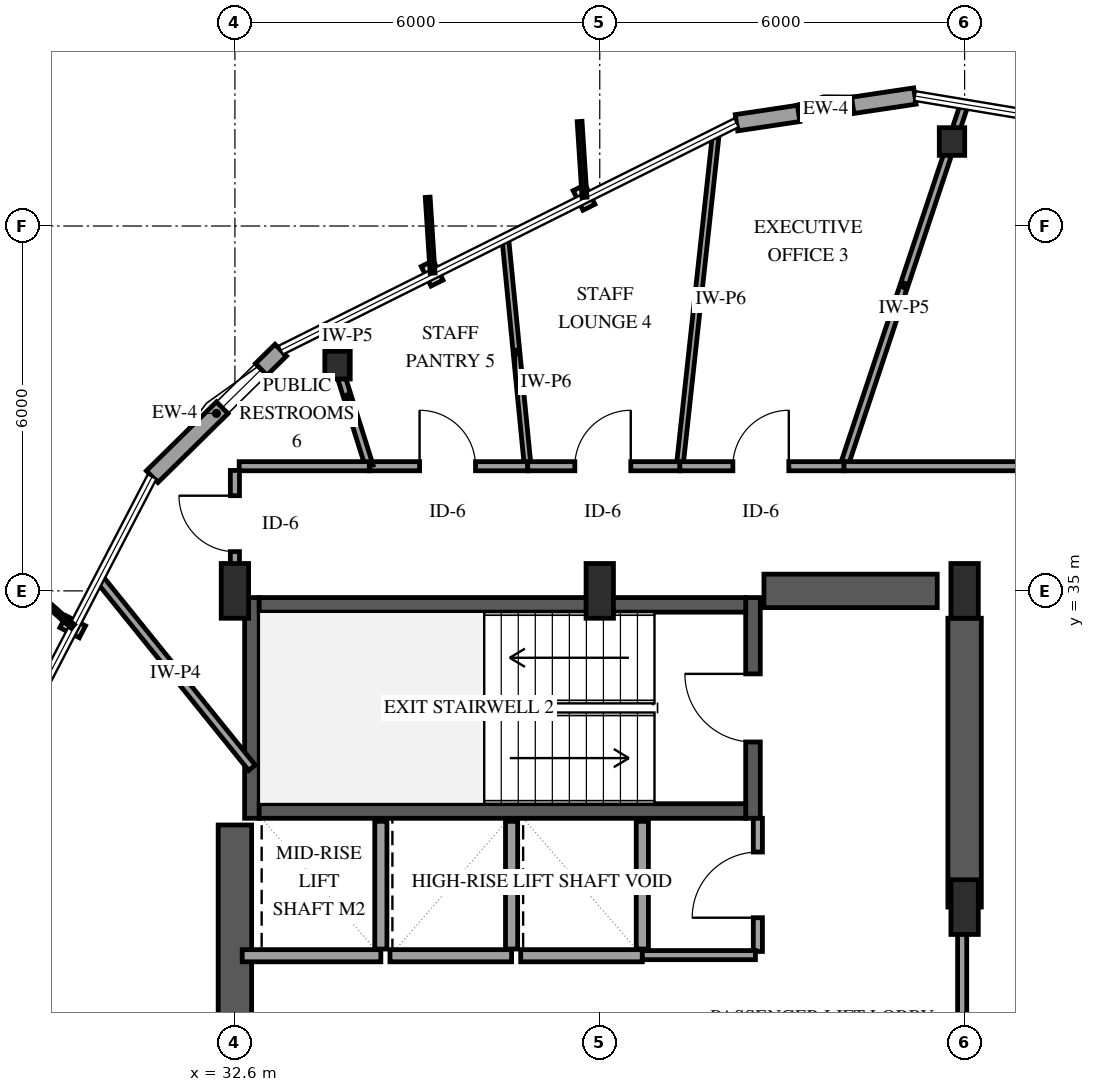
"""IFC4 building model, lengths in metres.
Left out: names, types, materials, properties, quantities, classifications, styles, units other than length and angle.
Written with IfcOpenShell. Run it as: python <this file> out.ifc"""

import sys

from ifc_helpers import new_model, si_unit, direction, frame, frame_2d, origin, origin_2d, place, context, subcontext, project, spatial, rectangle, i_section, extrude, element, fill, save


model = new_model("IFC4")
c1 = context("Model", 3, precision=1e-05, world=origin(), true_north=direction((0.0, 1.0)))
c2 = subcontext(c1, "Body", "Model", "MODEL_VIEW")
j1 = project(units=[si_unit("LENGTHUNIT", "METRE"), si_unit("PLANEANGLEUNIT", "RADIAN")], contexts=[c1])
p1 = place(None, origin())
s1 = spatial("IfcSite", under=j1, at=p1, CompositionType="ELEMENT")
p2 = place(p1, origin())
s2 = spatial("IfcBuilding", under=s1, at=p2, CompositionType="ELEMENT")
p3 = place(p2, frame((0.0, 0.0, 130.3)))
s3 = spatial("IfcBuildingStorey", under=s2, at=p3, CompositionType="ELEMENT", Elevation=130.3)
p4 = place(p3, frame((32.88, 31.26, 0.0), z_axis=(0.0, 0.0, 1.0), x_axis=(0.0, 1.0, 0.0)))
e1 = element("IfcWall", 1, at=p4, inside=s3, PredefinedType="SHEAR", context=c2, shape_type="SweptSolid", body=[
    extrude(rectangle(XDim=3.63, YDim=0.24, at=frame_2d((1.815, 0.0))), origin(), (0.0, 0.0, 1.0), 3.9),
])
p5 = place(p3, frame((41.12, 31.26, 0.0), z_axis=(0.0, 0.0, 1.0), x_axis=(0.0, 1.0, 0.0)))
e2 = element("IfcWall", 2, at=p5, inside=s3, PredefinedType="SHEAR", context=c2, shape_type="SweptSolid", body=[
    extrude(rectangle(XDim=3.63, YDim=0.24, at=frame_2d((1.815, 0.0))), origin(), (0.0, 0.0, 1.0), 3.9),
])
p6 = place(p5, frame((1.255, 0.0, 0.0)))
e3 = element("IfcOpeningElement", 3, at=p6, cuts=e2, PredefinedType="OPENING", context=c2, shape_type="SweptSolid", body=[
    extrude(rectangle(XDim=1.12, YDim=2.15, at=frame_2d((0.56, 1.075))), frame((0.0, 0.13, 0.0), z_axis=(0.0, -1.0, 0.0), x_axis=(1.0, 0.0, 0.0)), (0.0, 0.0, 1.0), 0.26),
])
for number, where, z_axis, x_axis in (
    (4, (33.0, 31.38, 0.0), (0.0, 0.0, 1.0), (1.0, 0.0, 0.0)),
    (5, (33.0, 34.77, 0.0), (0.0, 0.0, 1.0), (1.0, 0.0, 0.0)),
):
    element("IfcWall", number, at=place(p3, frame(where, z_axis=z_axis, x_axis=x_axis)), inside=s3, PredefinedType="SHEAR", context=c2, shape_type="SweptSolid", body=[
        extrude(rectangle(XDim=8.0, YDim=0.24, at=frame_2d((4.0, 0.0))), origin(), (0.0, 0.0, 1.0), 3.9),
    ])
p7 = place(p3, frame((32.6, 18.85, 0.0), z_axis=(0.0, 0.0, 1.0), x_axis=(0.0, 1.0, 0.0)))
e6 = element("IfcWall", 6, at=p7, inside=s3, PredefinedType="SHEAR", context=c2, shape_type="SweptSolid", body=[
    extrude(rectangle(XDim=12.3, YDim=0.55, at=frame_2d((6.15, 0.0))), origin(), (0.0, 0.0, 1.0), 3.9),
])
p8 = place(p3, frame((41.3, 35.0, 0.0), z_axis=(0.0, 0.0, 1.0), x_axis=(1.0, 0.0, 0.0)))
e7 = element("IfcWall", 7, at=p8, inside=s3, PredefinedType="SHEAR", context=c2, shape_type="SweptSolid", body=[
    extrude(rectangle(XDim=2.85, YDim=0.55, at=frame_2d((1.425, 0.0))), origin(), (0.0, 0.0, 1.0), 3.9),
])
p9 = place(p3, frame((44.6, 29.8, 0.0), z_axis=(0.0, 0.0, 1.0), x_axis=(0.0, 1.0, 0.0)))
e8 = element("IfcWall", 8, at=p9, inside=s3, PredefinedType="SHEAR", context=c2, shape_type="SweptSolid", body=[
    extrude(rectangle(XDim=4.75, YDim=0.55, at=frame_2d((2.375, 0.0))), origin(), (0.0, 0.0, 1.0), 3.9),
])
for number, where, z_axis, x_axis in (
    (9, (32.6, 35.0, 0.0), (0.0, 0.0, 1.0), (1.0, 0.0, 0.0)),
    (10, (38.6, 35.0, 0.0), (0.0, 0.0, 1.0), (1.0, 0.0, 0.0)),
    (11, (44.6, 29.8, 0.0), (0.0, 0.0, 1.0), (1.0, 0.0, 0.0)),
    (12, (44.6, 35.0, 0.0), (0.0, 0.0, 1.0), (1.0, 0.0, 0.0)),
):
    element("IfcColumn", number, at=place(p3, frame(where, z_axis=z_axis, x_axis=x_axis)), inside=s3, PredefinedType="PILASTER", context=c2, shape_type="SweptSolid", body=[
        extrude(rectangle(XDim=0.45, YDim=0.9, at=origin_2d()), origin(), (0.0, 0.0, 1.0), 3.9),
    ])
for number, where, z_axis, x_axis in (
    (13, (44.393, 42.389, 0.0), (0.0, 0.0, 1.0), (1.0, 0.0, 0.0)),
    (14, (34.288, 38.711, 0.0), (0.0, 0.0, 1.0), (1.0, 0.0, 0.0)),
):
    element("IfcColumn", number, at=place(p3, frame(where, z_axis=z_axis, x_axis=x_axis)), inside=s3, PredefinedType="COLUMN", context=c2, shape_type="SweptSolid", body=[
        extrude(i_section(OverallWidth=0.418, OverallDepth=0.455, WebThickness=0.042, FlangeThickness=0.068, FilletRadius=0.038, at=origin_2d()), origin(), (0.0, 0.0, 1.0), 3.9),
    ])
p10 = place(p3, frame((43.783, 43.138, 0.0), z_axis=(0.0, 0.0, 1.0), x_axis=(-0.988967117617, -0.148135209429, 0.0)))
e15 = element("IfcWall", 15, at=p10, inside=s3, PredefinedType="SOLIDWALL", context=c2, shape_type="SweptSolid", body=[
    extrude(rectangle(XDim=2.967, YDim=0.27, at=frame_2d((1.483, 0.0))), origin(), (0.0, 0.0, 1.0), 2.939),
])
p11 = place(p10, frame((1.033, 0.0, 0.75)))
e16 = element("IfcOpeningElement", 16, at=p11, cuts=e15, PredefinedType="OPENING", context=c2, shape_type="SweptSolid", body=[
    extrude(rectangle(XDim=0.9, YDim=1.5, at=frame_2d((0.45, 0.75))), frame((0.0, 0.145, 0.0), z_axis=(0.0, -1.0, 0.0), x_axis=(1.0, 0.0, 0.0)), (0.0, 0.0, 1.0), 0.29),
])
p12 = place(p3, frame((33.354, 38.958, 0.0), z_axis=(0.0, 0.0, 1.0), x_axis=(-0.713048365922, -0.701114846409, 0.0)))
e17 = element("IfcWall", 17, at=p12, inside=s3, PredefinedType="SOLIDWALL", context=c2, shape_type="SweptSolid", body=[
    extrude(rectangle(XDim=2.967, YDim=0.27, at=frame_2d((1.483, 0.0))), origin(), (0.0, 0.0, 1.0), 2.939),
])
p13 = place(p12, frame((0.45, 0.0, 0.75)))
e18 = element("IfcOpeningElement", 18, at=p13, cuts=e17, PredefinedType="OPENING", context=c2, shape_type="SweptSolid", body=[
    extrude(rectangle(XDim=0.9, YDim=1.5, at=frame_2d((0.45, 0.75))), frame((0.0, 0.145, 0.0), z_axis=(0.0, -1.0, 0.0), x_axis=(1.0, 0.0, 0.0)), (0.0, 0.0, 1.0), 0.29),
])
p14 = place(p3, frame((32.72, 29.0, 0.0), z_axis=(0.0, 0.0, 1.0), x_axis=(1.0, 0.0, 0.0)))
e19 = element("IfcWall", 19, at=p14, inside=s3, PredefinedType="SOLIDWALL", context=c2, shape_type="SweptSolid", body=[
    extrude(rectangle(XDim=2.28, YDim=0.2, at=frame_2d((1.14, 0.0))), origin(), (0.0, 0.0, 1.0), 3.56),
])
p15 = place(p3, frame((35.0, 29.11, 0.0), z_axis=(0.0, 0.0, 1.0), x_axis=(0.0, 1.0, 0.0)))
e20 = element("IfcWall", 20, at=p15, inside=s3, PredefinedType="SOLIDWALL", context=c2, shape_type="SweptSolid", body=[
    extrude(rectangle(XDim=2.1, YDim=0.2, at=frame_2d((1.05, 0.0))), origin(), (0.0, 0.0, 1.0), 3.56),
])
p16 = place(p3, frame((35.15, 29.0, 0.0), z_axis=(0.0, 0.0, 1.0), x_axis=(1.0, 0.0, 0.0)))
e21 = element("IfcWall", 21, at=p16, inside=s3, PredefinedType="SOLIDWALL", context=c2, shape_type="SweptSolid", body=[
    extrude(rectangle(XDim=2.0, YDim=0.2, at=frame_2d((1.0, 0.0))), origin(), (0.0, 0.0, 1.0), 3.56),
])
p17 = place(p3, frame((37.15, 29.11, 0.0), z_axis=(0.0, 0.0, 1.0), x_axis=(0.0, 1.0, 0.0)))
e22 = element("IfcWall", 22, at=p17, inside=s3, PredefinedType="SOLIDWALL", context=c2, shape_type="SweptSolid", body=[
    extrude(rectangle(XDim=2.1, YDim=0.2, at=frame_2d((1.05, 0.0))), origin(), (0.0, 0.0, 1.0), 3.56),
])
p18 = place(p3, frame((37.3, 29.0, 0.0), z_axis=(0.0, 0.0, 1.0), x_axis=(1.0, 0.0, 0.0)))
e23 = element("IfcWall", 23, at=p18, inside=s3, PredefinedType="SOLIDWALL", context=c2, shape_type="SweptSolid", body=[
    extrude(rectangle(XDim=2.0, YDim=0.2, at=frame_2d((1.0, 0.0))), origin(), (0.0, 0.0, 1.0), 3.56),
])
p19 = place(p3, frame((39.3, 29.11, 0.0), z_axis=(0.0, 0.0, 1.0), x_axis=(0.0, 1.0, 0.0)))
e24 = element("IfcWall", 24, at=p19, inside=s3, PredefinedType="SOLIDWALL", context=c2, shape_type="SweptSolid", body=[
    extrude(rectangle(XDim=2.1, YDim=0.2, at=frame_2d((1.05, 0.0))), origin(), (0.0, 0.0, 1.0), 3.56),
])
p20 = place(p3, frame((44.56, 29.8, 0.0), z_axis=(0.0, 0.0, 1.0), x_axis=(0.0, -1.0, 0.0)))
e25 = element("IfcWall", 25, at=p20, inside=s3, PredefinedType="PARTITIONING", context=c2, shape_type="SweptSolid", body=[
    extrude(rectangle(XDim=6.91, YDim=0.15, at=frame_2d((3.455, 0.0))), origin(), (0.0, 0.0, 1.0), 2.6),
])
p21 = place(p20, frame((2.915, 0.0, 0.0)))
e26 = element("IfcOpeningElement", 26, at=p21, cuts=e25, PredefinedType="OPENING", context=c2, shape_type="SweptSolid", body=[
    extrude(rectangle(XDim=1.08, YDim=2.15, at=frame_2d((0.54, 1.075))), frame((0.0, 0.085, 0.0), z_axis=(0.0, -1.0, 0.0), x_axis=(1.0, 0.0, 0.0)), (0.0, 0.0, 1.0), 0.17),
])
p22 = place(p3, frame((42.614, 37.05, 0.0), z_axis=(0.0, 0.0, 1.0), x_axis=(0.315935866472, 0.948780548007, 0.0)))
e27 = element("IfcWall", 27, at=p22, inside=s3, PredefinedType="PARTITIONING", context=c2, shape_type="SweptSolid", body=[
    extrude(rectangle(XDim=6.273, YDim=0.13, at=frame_2d((3.137, 0.0))), origin(), (0.0, 0.0, 1.0), 2.855),
])
p23 = place(p3, frame((39.915, 37.05, 0.0), z_axis=(0.0, 0.0, 1.0), x_axis=(0.108112469568, 0.994138669364, 0.0)))
e28 = element("IfcWall", 28, at=p23, inside=s3, PredefinedType="PARTITIONING", context=c2, shape_type="SweptSolid", body=[
    extrude(rectangle(XDim=5.512, YDim=0.11, at=frame_2d((2.756, 0.0))), origin(), (0.0, 0.0, 1.0), 3.56),
])
p24 = place(p3, frame((32.88, 32.091, 0.0), z_axis=(0.0, 0.0, 1.0), x_axis=(-0.627971930716, 0.77823598878, 0.0)))
e29 = element("IfcWall", 29, at=p24, inside=s3, PredefinedType="PARTITIONING", context=c2, shape_type="SweptSolid", body=[
    extrude(rectangle(XDim=4.0, YDim=0.14, at=frame_2d((2.0, 0.0))), origin(), (0.0, 0.0, 1.0), 3.56),
])
p25 = place(p3, frame((42.614, 37.05, 0.0), z_axis=(0.0, 0.0, 1.0), x_axis=(1.0, 0.0, 0.0)))
e30 = element("IfcWall", 30, at=p25, inside=s3, PredefinedType="PARTITIONING", context=c2, shape_type="SweptSolid", body=[
    extrude(rectangle(XDim=3.966, YDim=0.15, at=frame_2d((1.983, 0.0))), origin(), (0.0, 0.0, 1.0), 3.56),
])
p26 = place(p3, frame((37.415, 37.05, 0.0), z_axis=(0.0, 0.0, 1.0), x_axis=(-0.097938751342, 0.995192444196, 0.0)))
e31 = element("IfcWall", 31, at=p26, inside=s3, PredefinedType="PARTITIONING", context=c2, shape_type="SweptSolid", body=[
    extrude(rectangle(XDim=3.769, YDim=0.11, at=frame_2d((1.885, 0.0))), origin(), (0.0, 0.0, 1.0), 3.56),
])
p27 = place(p3, frame((39.915, 37.05, 0.0), z_axis=(0.0, 0.0, 1.0), x_axis=(1.0, 0.0, 0.0)))
e32 = element("IfcWall", 32, at=p27, inside=s3, PredefinedType="PARTITIONING", context=c2, shape_type="SweptSolid", body=[
    extrude(rectangle(XDim=2.699, YDim=0.15, at=frame_2d((1.35, 0.0))), origin(), (0.0, 0.0, 1.0), 3.56),
])
p28 = place(p27, frame((0.874, 0.0, 0.0)))
e33 = element("IfcOpeningElement", 33, at=p28, cuts=e32, PredefinedType="OPENING", context=c2, shape_type="SweptSolid", body=[
    extrude(rectangle(XDim=0.92, YDim=2.12, at=frame_2d((0.46, 1.06))), frame((0.0, 0.085, 0.0), z_axis=(0.0, -1.0, 0.0), x_axis=(1.0, 0.0, 0.0)), (0.0, 0.0, 1.0), 0.17),
])
p29 = place(p3, frame((34.81, 37.05, 0.0), z_axis=(0.0, 0.0, 1.0), x_axis=(1.0, 0.0, 0.0)))
e34 = element("IfcWall", 34, at=p29, inside=s3, PredefinedType="PARTITIONING", context=c2, shape_type="SweptSolid", body=[
    extrude(rectangle(XDim=2.605, YDim=0.15, at=frame_2d((1.302, 0.0))), origin(), (0.0, 0.0, 1.0), 3.56),
])
p30 = place(p29, frame((0.827, 0.0, 0.0)))
e35 = element("IfcOpeningElement", 35, at=p30, cuts=e34, PredefinedType="OPENING", context=c2, shape_type="SweptSolid", body=[
    extrude(rectangle(XDim=0.92, YDim=2.12, at=frame_2d((0.46, 1.06))), frame((0.0, 0.085, 0.0), z_axis=(0.0, -1.0, 0.0), x_axis=(1.0, 0.0, 0.0)), (0.0, 0.0, 1.0), 0.17),
])
p31 = place(p3, frame((37.415, 37.05, 0.0), z_axis=(0.0, 0.0, 1.0), x_axis=(1.0, 0.0, 0.0)))
e36 = element("IfcWall", 36, at=p31, inside=s3, PredefinedType="PARTITIONING", context=c2, shape_type="SweptSolid", body=[
    extrude(rectangle(XDim=2.5, YDim=0.15, at=frame_2d((1.25, 0.0))), origin(), (0.0, 0.0, 1.0), 3.56),
])
p32 = place(p31, frame((0.775, 0.0, 0.0)))
e37 = element("IfcOpeningElement", 37, at=p32, cuts=e36, PredefinedType="OPENING", context=c2, shape_type="SweptSolid", body=[
    extrude(rectangle(XDim=0.92, YDim=2.12, at=frame_2d((0.46, 1.06))), frame((0.0, 0.085, 0.0), z_axis=(0.0, -1.0, 0.0), x_axis=(1.0, 0.0, 0.0)), (0.0, 0.0, 1.0), 0.17),
])
p33 = place(p3, frame((34.81, 37.05, 0.0), z_axis=(0.0, 0.0, 1.0), x_axis=(-0.300010116479, 0.953936019872, 0.0)))
e38 = element("IfcWall", 38, at=p33, inside=s3, PredefinedType="PARTITIONING", context=c2, shape_type="SweptSolid", body=[
    extrude(rectangle(XDim=2.387, YDim=0.13, at=frame_2d((1.193, 0.0))), origin(), (0.0, 0.0, 1.0), 2.855),
])
p34 = place(p3, frame((41.2, 29.07, 0.0), z_axis=(0.0, 0.0, 1.0), x_axis=(0.0, 1.0, 0.0)))
e39 = element("IfcWall", 39, at=p34, inside=s3, PredefinedType="PARTITIONING", context=c2, shape_type="SweptSolid", body=[
    extrude(rectangle(XDim=2.19, YDim=0.15, at=frame_2d((1.095, 0.0))), origin(), (0.0, 0.0, 1.0), 3.56),
])
p35 = place(p34, frame((0.555, 0.0, 0.0)))
e40 = element("IfcOpeningElement", 40, at=p35, cuts=e39, PredefinedType="OPENING", context=c2, shape_type="SweptSolid", body=[
    extrude(rectangle(XDim=1.08, YDim=2.15, at=frame_2d((0.54, 1.075))), frame((0.0, 0.085, 0.0), z_axis=(0.0, -1.0, 0.0), x_axis=(1.0, 0.0, 0.0)), (0.0, 0.0, 1.0), 0.17),
])
p36 = place(p3, frame((32.67, 37.05, 0.0), z_axis=(0.0, 0.0, 1.0), x_axis=(1.0, 0.0, 0.0)))
e41 = element("IfcWall", 41, at=p36, inside=s3, PredefinedType="PARTITIONING", context=c2, shape_type="SweptSolid", body=[
    extrude(rectangle(XDim=2.14, YDim=0.15, at=frame_2d((1.07, 0.0))), origin(), (0.0, 0.0, 1.0), 3.56),
])
p37 = place(p3, frame((32.6, 35.07, 0.0), z_axis=(0.0, 0.0, 1.0), x_axis=(0.0, 1.0, 0.0)))
e42 = element("IfcWall", 42, at=p37, inside=s3, PredefinedType="PARTITIONING", context=c2, shape_type="SweptSolid", body=[
    extrude(rectangle(XDim=1.91, YDim=0.15, at=frame_2d((0.955, 0.0))), origin(), (0.0, 0.0, 1.0), 3.56),
])
p38 = place(p37, frame((0.575, 0.0, 0.0)))
e43 = element("IfcOpeningElement", 43, at=p38, cuts=e42, PredefinedType="OPENING", context=c2, shape_type="SweptSolid", body=[
    extrude(rectangle(XDim=0.92, YDim=2.12, at=frame_2d((0.46, 1.06))), frame((0.0, 0.085, 0.0), z_axis=(0.0, -1.0, 0.0), x_axis=(1.0, 0.0, 0.0)), (0.0, 0.0, 1.0), 0.17),
])
p39 = place(p3, frame((39.3, 29.01, 0.0), z_axis=(0.0, 0.0, 1.0), x_axis=(1.0, 0.0, 0.0)))
e44 = element("IfcWall", 44, at=p39, inside=s3, PredefinedType="PARTITIONING", context=c2, shape_type="SweptSolid", body=[
    extrude(rectangle(XDim=1.86, YDim=0.15, at=frame_2d((0.93, 0.0))), origin(), (0.0, 0.0, 1.0), 3.56),
])
p40 = place(p11, origin())
e45 = element("IfcWindow", 45, at=p40, inside=s3, PartitioningType="SINGLE_PANEL", PredefinedType="WINDOW", context=c2, shape_type="SweptSolid", body=[
    extrude(rectangle(XDim=0.9, YDim=1.5, at=frame_2d((0.45, 0.75))), frame((0.0, 0.03, 0.0), z_axis=(0.0, -1.0, 0.0), x_axis=(1.0, 0.0, 0.0)), (0.0, 0.0, 1.0), 0.06),
])
fill(e16, e45)
p41 = place(p13, origin())
e46 = element("IfcWindow", 46, at=p41, inside=s3, PartitioningType="SINGLE_PANEL", PredefinedType="WINDOW", context=c2, shape_type="SweptSolid", body=[
    extrude(rectangle(XDim=0.9, YDim=1.5, at=frame_2d((0.45, 0.75))), frame((0.0, 0.03, 0.0), z_axis=(0.0, -1.0, 0.0), x_axis=(1.0, 0.0, 0.0)), (0.0, 0.0, 1.0), 0.06),
])
fill(e18, e46)
p42 = place(p6, origin())
e47 = element("IfcDoor", 47, at=p42, inside=s3, OperationType="SINGLE_SWING_RIGHT", PredefinedType="DOOR", context=c2, shape_type="SweptSolid", body=[
    extrude(rectangle(XDim=1.12, YDim=2.15, at=frame_2d((0.56, 1.075))), frame((0.0, 0.025, 0.0), z_axis=(0.0, -1.0, 0.0), x_axis=(1.0, 0.0, 0.0)), (0.0, 0.0, 1.0), 0.05),
])
fill(e3, e47)
p43 = place(p28, origin())
e48 = element("IfcDoor", 48, at=p43, inside=s3, OperationType="SINGLE_SWING_RIGHT", PredefinedType="DOOR", context=c2, shape_type="SweptSolid", body=[
    extrude(rectangle(XDim=0.92, YDim=2.12, at=frame_2d((0.46, 1.06))), frame((0.0, 0.025, 0.0), z_axis=(0.0, -1.0, 0.0), x_axis=(1.0, 0.0, 0.0)), (0.0, 0.0, 1.0), 0.05),
])
fill(e33, e48)
p44 = place(p30, origin())
e49 = element("IfcDoor", 49, at=p44, inside=s3, OperationType="SINGLE_SWING_LEFT", PredefinedType="DOOR", context=c2, shape_type="SweptSolid", body=[
    extrude(rectangle(XDim=0.92, YDim=2.12, at=frame_2d((0.46, 1.06))), frame((0.0, 0.025, 0.0), z_axis=(0.0, -1.0, 0.0), x_axis=(1.0, 0.0, 0.0)), (0.0, 0.0, 1.0), 0.05),
])
fill(e35, e49)
p45 = place(p32, origin())
e50 = element("IfcDoor", 50, at=p45, inside=s3, OperationType="SINGLE_SWING_RIGHT", PredefinedType="DOOR", context=c2, shape_type="SweptSolid", body=[
    extrude(rectangle(XDim=0.92, YDim=2.12, at=frame_2d((0.46, 1.06))), frame((0.0, 0.025, 0.0), z_axis=(0.0, -1.0, 0.0), x_axis=(1.0, 0.0, 0.0)), (0.0, 0.0, 1.0), 0.05),
])
fill(e37, e50)
p46 = place(p35, origin())
e51 = element("IfcDoor", 51, at=p46, inside=s3, OperationType="SINGLE_SWING_LEFT", PredefinedType="DOOR", context=c2, shape_type="SweptSolid", body=[
    extrude(rectangle(XDim=1.08, YDim=2.15, at=frame_2d((0.54, 1.075))), frame((0.0, 0.025, 0.0), z_axis=(0.0, -1.0, 0.0), x_axis=(1.0, 0.0, 0.0)), (0.0, 0.0, 1.0), 0.05),
])
fill(e40, e51)
p47 = place(p38, origin())
e52 = element("IfcDoor", 52, at=p47, inside=s3, OperationType="SINGLE_SWING_RIGHT", PredefinedType="DOOR", context=c2, shape_type="SweptSolid", body=[
    extrude(rectangle(XDim=0.92, YDim=2.12, at=frame_2d((0.46, 1.06))), frame((0.0, 0.025, 0.0), z_axis=(0.0, -1.0, 0.0), x_axis=(1.0, 0.0, 0.0)), (0.0, 0.0, 1.0), 0.05),
])
fill(e43, e52)
save(model, sys.argv[1])
